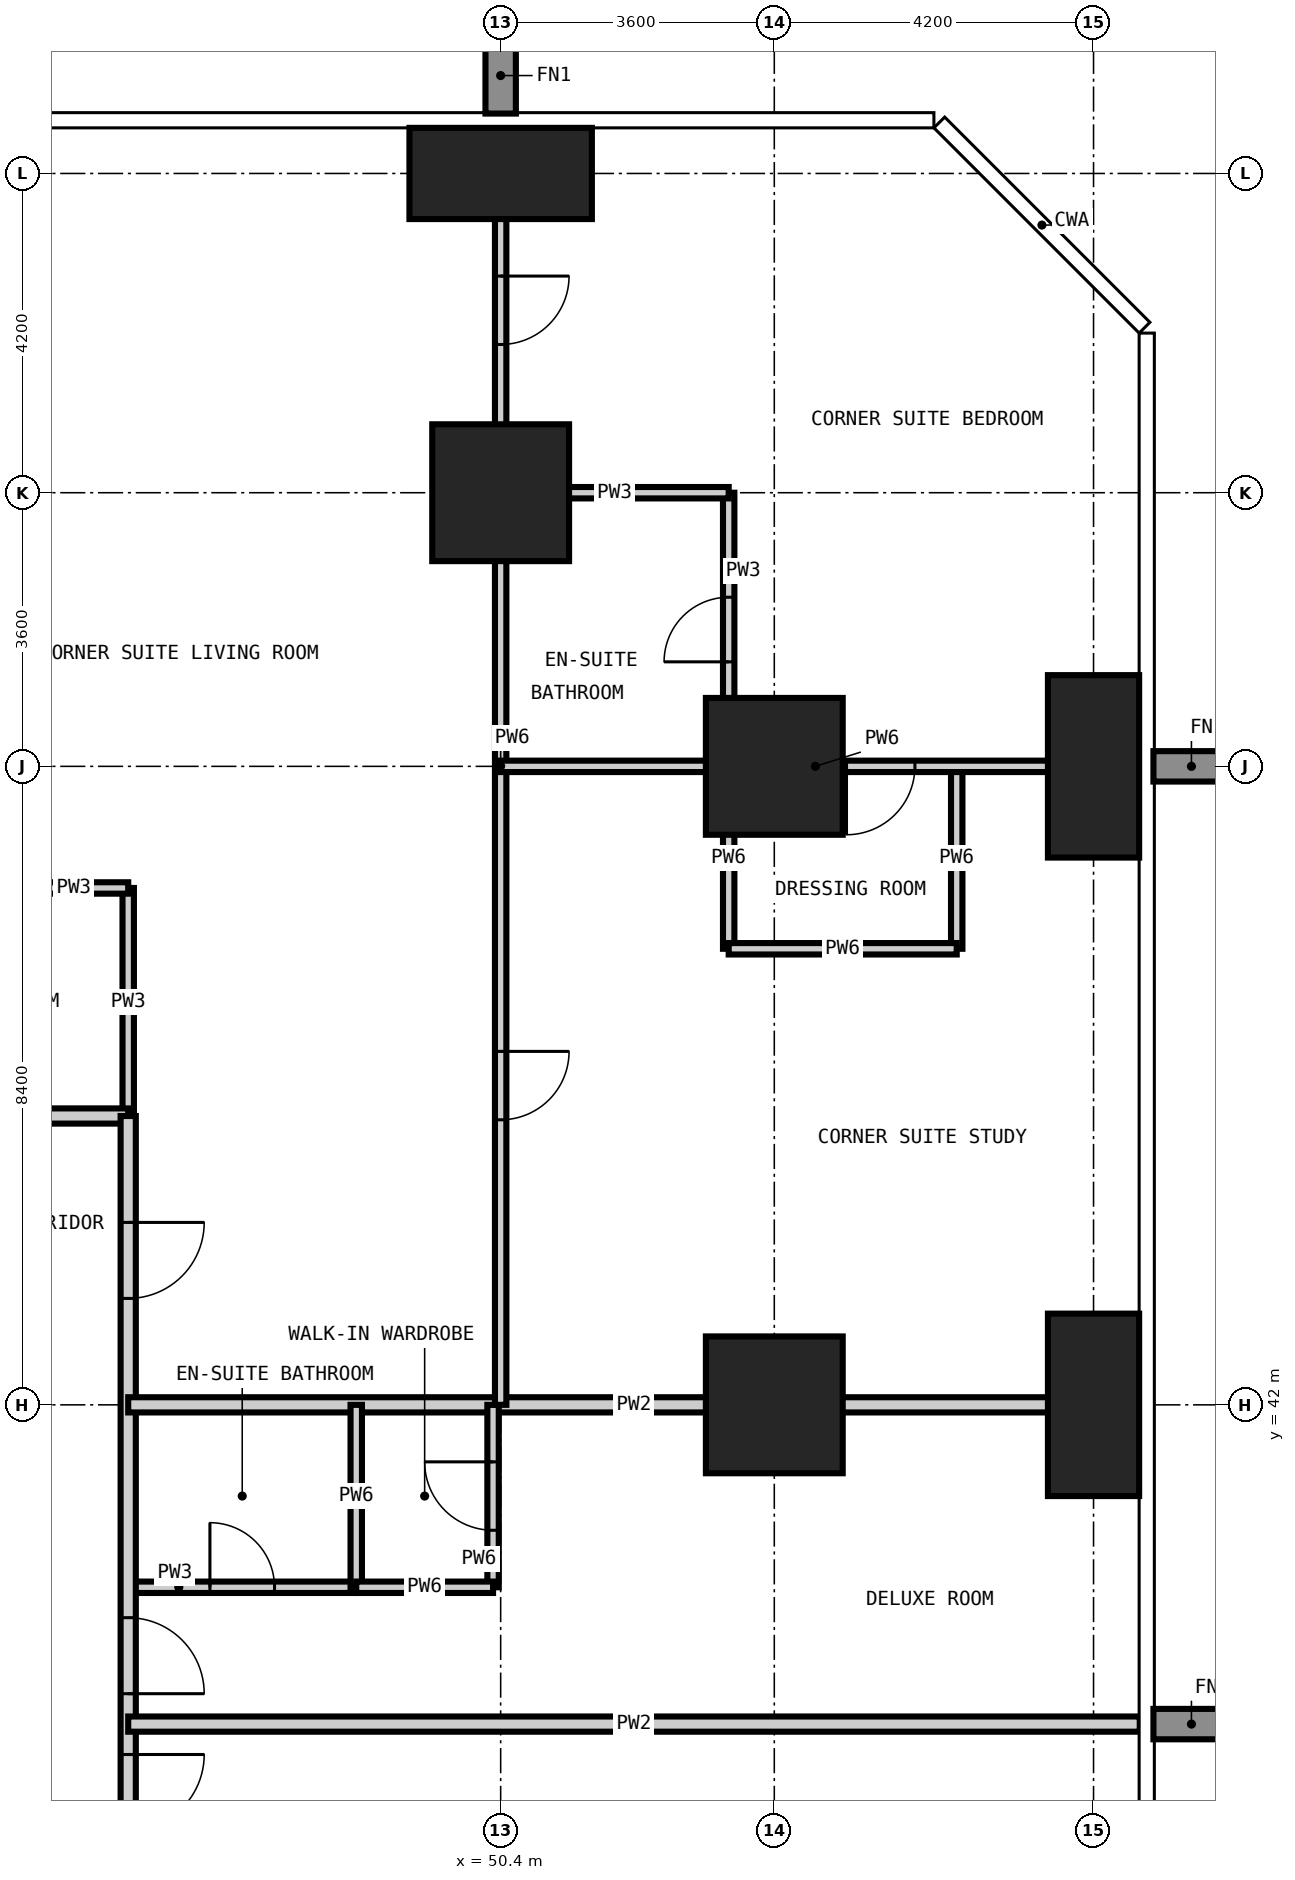
"""IFC4 building model, lengths in metres.
Left out: names, types, materials, properties, quantities, classifications, styles, units other than length and angle.
Written with IfcOpenShell. Run it as: python <this file> out.ifc"""

import sys

from ifc_helpers import new_model, si_unit, direction, frame, frame_2d, origin, origin_2d, place, context, subcontext, project, spatial, rectangle, extrude, element, fill, save


model = new_model("IFC4")
c1 = context("Model", 3, precision=1e-05, world=origin(), true_north=direction((0.0, 1.0)))
c2 = subcontext(c1, "Body", "Model", "MODEL_VIEW")
j1 = project(units=[si_unit("LENGTHUNIT", "METRE"), si_unit("PLANEANGLEUNIT", "RADIAN")], contexts=[c1])
p1 = place(None, origin())
s1 = spatial("IfcSite", under=j1, at=p1, CompositionType="ELEMENT")
p2 = place(p1, origin())
s2 = spatial("IfcBuilding", under=s1, at=p2, CompositionType="ELEMENT")
p3 = place(p2, frame((0.0, 0.0, 30.6)))
s3 = spatial("IfcBuildingStorey", under=s2, at=p3, CompositionType="ELEMENT", Elevation=30.6)
p4 = place(p3, frame((50.4, 54.0, -0.35), z_axis=(0.0, 0.0, 1.0), x_axis=(1.0, 0.0, 0.0)))
e1 = element("IfcColumn", 1, at=p4, inside=s3, PredefinedType="COLUMN", context=c2, shape_type="SweptSolid", body=[
    extrude(rectangle(XDim=1.8, YDim=1.8, at=origin_2d()), origin(), (0.0, 0.0, 1.0), 3.6),
])
p5 = place(p3, frame((50.4, 58.2, -0.35), z_axis=(0.0, 0.0, 1.0), x_axis=(1.0, 0.0, 0.0)))
e2 = element("IfcColumn", 2, at=p5, inside=s3, PredefinedType="COLUMN", context=c2, shape_type="SweptSolid", body=[
    extrude(rectangle(XDim=2.4, YDim=1.2, at=origin_2d()), origin(), (0.0, 0.0, 1.0), 3.6),
])
for number, where, z_axis, x_axis in (
    (3, (54.0, 42.0, -0.35), (0.0, 0.0, 1.0), (1.0, 0.0, 0.0)),
    (4, (54.0, 50.4, -0.35), (0.0, 0.0, 1.0), (1.0, 0.0, 0.0)),
):
    element("IfcColumn", number, at=place(p3, frame(where, z_axis=z_axis, x_axis=x_axis)), inside=s3, PredefinedType="COLUMN", context=c2, shape_type="SweptSolid", body=[
        extrude(rectangle(XDim=1.8, YDim=1.8, at=origin_2d()), origin(), (0.0, 0.0, 1.0), 3.6),
    ])
for number, where, z_axis, x_axis in (
    (5, (58.2, 42.0, -0.35), (0.0, 0.0, 1.0), (1.0, 0.0, 0.0)),
    (6, (58.2, 50.4, -0.35), (0.0, 0.0, 1.0), (1.0, 0.0, 0.0)),
):
    element("IfcColumn", number, at=place(p3, frame(where, z_axis=z_axis, x_axis=x_axis)), inside=s3, PredefinedType="COLUMN", context=c2, shape_type="SweptSolid", body=[
        extrude(rectangle(XDim=1.2, YDim=2.4, at=origin_2d()), origin(), (0.0, 0.0, 1.0), 3.6),
    ])
p6 = place(p3, frame((45.5, 45.8, 0.0), z_axis=(0.0, 0.0, 1.0), x_axis=(0.0, 1.0, 0.0)))
e7 = element("IfcWall", 7, at=p6, inside=s3, PredefinedType="PARTITIONING", context=c2, shape_type="SweptSolid", body=[
    extrude(rectangle(XDim=3.0, YDim=0.15, at=frame_2d((1.5, 0.0))), origin(), (0.0, 0.0, 1.0), 3.25),
])
p7 = place(p3, frame((53.4, 50.4, 0.0), z_axis=(0.0, 0.0, 1.0), x_axis=(0.0, 1.0, 0.0)))
e8 = element("IfcWall", 8, at=p7, inside=s3, PredefinedType="PARTITIONING", context=c2, shape_type="SweptSolid", body=[
    extrude(rectangle(XDim=3.6, YDim=0.15, at=frame_2d((1.8, 0.0))), origin(), (0.0, 0.0, 1.0), 3.25),
])
p8 = place(p7, frame((1.375, 0.0, 0.0)))
e9 = element("IfcOpeningElement", 9, at=p8, cuts=e8, PredefinedType="OPENING", context=c2, shape_type="SweptSolid", body=[
    extrude(rectangle(XDim=0.85, YDim=2.1, at=frame_2d((0.425, 1.05))), frame((0.0, 0.085, 0.0), z_axis=(0.0, -1.0, 0.0), x_axis=(1.0, 0.0, 0.0)), (0.0, 0.0, 1.0), 0.17),
])
p9 = place(p3, frame((45.5, 39.6, 0.0), z_axis=(0.0, 0.0, 1.0), x_axis=(1.0, 0.0, 0.0)))
e10 = element("IfcWall", 10, at=p9, inside=s3, PredefinedType="PARTITIONING", context=c2, shape_type="SweptSolid", body=[
    extrude(rectangle(XDim=3.0, YDim=0.15, at=frame_2d((1.5, 0.0))), origin(), (0.0, 0.0, 1.0), 3.25),
])
p10 = place(p9, frame((1.075, 0.0, 0.0)))
e11 = element("IfcOpeningElement", 11, at=p10, cuts=e10, PredefinedType="OPENING", context=c2, shape_type="SweptSolid", body=[
    extrude(rectangle(XDim=0.85, YDim=2.1, at=frame_2d((0.425, 1.05))), frame((0.0, 0.085, 0.0), z_axis=(0.0, -1.0, 0.0), x_axis=(1.0, 0.0, 0.0)), (0.0, 0.0, 1.0), 0.17),
])
p11 = place(p3, frame((42.0, 48.8, 0.0), z_axis=(0.0, 0.0, 1.0), x_axis=(1.0, 0.0, 0.0)))
e12 = element("IfcWall", 12, at=p11, inside=s3, PredefinedType="PARTITIONING", context=c2, shape_type="SweptSolid", body=[
    extrude(rectangle(XDim=3.5, YDim=0.15, at=frame_2d((1.75, 0.0))), origin(), (0.0, 0.0, 1.0), 3.25),
])
p12 = place(p11, frame((1.325, 0.0, 0.0)))
e13 = element("IfcOpeningElement", 13, at=p12, cuts=e12, PredefinedType="OPENING", context=c2, shape_type="SweptSolid", body=[
    extrude(rectangle(XDim=0.85, YDim=2.1, at=frame_2d((0.425, 1.05))), frame((0.0, 0.085, 0.0), z_axis=(0.0, -1.0, 0.0), x_axis=(1.0, 0.0, 0.0)), (0.0, 0.0, 1.0), 0.17),
])
p13 = place(p3, frame((50.4, 54.0, 0.0), z_axis=(0.0, 0.0, 1.0), x_axis=(1.0, 0.0, 0.0)))
e14 = element("IfcWall", 14, at=p13, inside=s3, PredefinedType="PARTITIONING", context=c2, shape_type="SweptSolid", body=[
    extrude(rectangle(XDim=3.0, YDim=0.15, at=frame_2d((1.5, 0.0))), origin(), (0.0, 0.0, 1.0), 3.25),
])
p14 = place(p3, frame((13.6, 45.8, 0.0), z_axis=(0.0, 0.0, 1.0), x_axis=(1.0, 0.0, 0.0)))
e15 = element("IfcWall", 15, at=p14, inside=s3, PredefinedType="PARTITIONING", context=c2, shape_type="SweptSolid", body=[
    extrude(rectangle(XDim=31.9, YDim=0.2, at=frame_2d((15.95, 0.0))), origin(), (0.0, 0.0, 1.0), 3.25),
])
p15 = place(p14, frame((6.0, 0.0, 0.0)))
e16 = element("IfcOpeningElement", 16, at=p15, cuts=e15, PredefinedType="OPENING", context=c2, shape_type="SweptSolid", body=[
    extrude(rectangle(XDim=1.0, YDim=2.2, at=frame_2d((0.5, 1.1))), frame((0.0, 0.11, 0.0), z_axis=(0.0, -1.0, 0.0), x_axis=(1.0, 0.0, 0.0)), (0.0, 0.0, 1.0), 0.22),
])
p16 = place(p14, frame((7.8, 0.0, 0.0)))
e17 = element("IfcOpeningElement", 17, at=p16, cuts=e15, PredefinedType="OPENING", context=c2, shape_type="SweptSolid", body=[
    extrude(rectangle(XDim=1.0, YDim=2.2, at=frame_2d((0.5, 1.1))), frame((0.0, 0.11, 0.0), z_axis=(0.0, -1.0, 0.0), x_axis=(1.0, 0.0, 0.0)), (0.0, 0.0, 1.0), 0.22),
])
p17 = place(p14, frame((14.4, 0.0, 0.0)))
e18 = element("IfcOpeningElement", 18, at=p17, cuts=e15, PredefinedType="OPENING", context=c2, shape_type="SweptSolid", body=[
    extrude(rectangle(XDim=1.0, YDim=2.2, at=frame_2d((0.5, 1.1))), frame((0.0, 0.11, 0.0), z_axis=(0.0, -1.0, 0.0), x_axis=(1.0, 0.0, 0.0)), (0.0, 0.0, 1.0), 0.22),
])
p18 = place(p14, frame((16.2, 0.0, 0.0)))
e19 = element("IfcOpeningElement", 19, at=p18, cuts=e15, PredefinedType="OPENING", context=c2, shape_type="SweptSolid", body=[
    extrude(rectangle(XDim=1.0, YDim=2.2, at=frame_2d((0.5, 1.1))), frame((0.0, 0.11, 0.0), z_axis=(0.0, -1.0, 0.0), x_axis=(1.0, 0.0, 0.0)), (0.0, 0.0, 1.0), 0.22),
])
p19 = place(p14, frame((22.8, 0.0, 0.0)))
e20 = element("IfcOpeningElement", 20, at=p19, cuts=e15, PredefinedType="OPENING", context=c2, shape_type="SweptSolid", body=[
    extrude(rectangle(XDim=1.0, YDim=2.2, at=frame_2d((0.5, 1.1))), frame((0.0, 0.11, 0.0), z_axis=(0.0, -1.0, 0.0), x_axis=(1.0, 0.0, 0.0)), (0.0, 0.0, 1.0), 0.22),
])
p20 = place(p14, frame((24.6, 0.0, 0.0)))
e21 = element("IfcOpeningElement", 21, at=p20, cuts=e15, PredefinedType="OPENING", context=c2, shape_type="SweptSolid", body=[
    extrude(rectangle(XDim=1.0, YDim=2.2, at=frame_2d((0.5, 1.1))), frame((0.0, 0.11, 0.0), z_axis=(0.0, -1.0, 0.0), x_axis=(1.0, 0.0, 0.0)), (0.0, 0.0, 1.0), 0.22),
])
p21 = place(p3, frame((45.5, 45.8, 0.0), z_axis=(0.0, 0.0, 1.0), x_axis=(0.0, -1.0, 0.0)))
e22 = element("IfcWall", 22, at=p21, inside=s3, PredefinedType="PARTITIONING", context=c2, shape_type="SweptSolid", body=[
    extrude(rectangle(XDim=32.2, YDim=0.2, at=frame_2d((16.1, 0.0))), origin(), (0.0, 0.0, 1.0), 3.25),
])
p22 = place(p21, frame((26.4, 0.0, 0.0)))
e23 = element("IfcOpeningElement", 23, at=p22, cuts=e22, PredefinedType="OPENING", context=c2, shape_type="SweptSolid", body=[
    extrude(rectangle(XDim=1.0, YDim=2.2, at=frame_2d((0.5, 1.1))), frame((0.0, 0.11, 0.0), z_axis=(0.0, -1.0, 0.0), x_axis=(1.0, 0.0, 0.0)), (0.0, 0.0, 1.0), 0.22),
])
p23 = place(p21, frame((22.2, 0.0, 0.0)))
e24 = element("IfcOpeningElement", 24, at=p23, cuts=e22, PredefinedType="OPENING", context=c2, shape_type="SweptSolid", body=[
    extrude(rectangle(XDim=1.0, YDim=2.2, at=frame_2d((0.5, 1.1))), frame((0.0, 0.11, 0.0), z_axis=(0.0, -1.0, 0.0), x_axis=(1.0, 0.0, 0.0)), (0.0, 0.0, 1.0), 0.22),
])
p24 = place(p21, frame((16.8, 0.0, 0.0)))
e25 = element("IfcOpeningElement", 25, at=p24, cuts=e22, PredefinedType="OPENING", context=c2, shape_type="SweptSolid", body=[
    extrude(rectangle(XDim=1.0, YDim=2.2, at=frame_2d((0.5, 1.1))), frame((0.0, 0.11, 0.0), z_axis=(0.0, -1.0, 0.0), x_axis=(1.0, 0.0, 0.0)), (0.0, 0.0, 1.0), 0.22),
])
p25 = place(p21, frame((15.0, 0.0, 0.0)))
e26 = element("IfcOpeningElement", 26, at=p25, cuts=e22, PredefinedType="OPENING", context=c2, shape_type="SweptSolid", body=[
    extrude(rectangle(XDim=1.0, YDim=2.2, at=frame_2d((0.5, 1.1))), frame((0.0, 0.11, 0.0), z_axis=(0.0, -1.0, 0.0), x_axis=(1.0, 0.0, 0.0)), (0.0, 0.0, 1.0), 0.22),
])
p26 = place(p21, frame((8.4, 0.0, 0.0)))
e27 = element("IfcOpeningElement", 27, at=p26, cuts=e22, PredefinedType="OPENING", context=c2, shape_type="SweptSolid", body=[
    extrude(rectangle(XDim=1.0, YDim=2.2, at=frame_2d((0.5, 1.1))), frame((0.0, 0.11, 0.0), z_axis=(0.0, -1.0, 0.0), x_axis=(1.0, 0.0, 0.0)), (0.0, 0.0, 1.0), 0.22),
])
p27 = place(p21, frame((6.6, 0.0, 0.0)))
e28 = element("IfcOpeningElement", 28, at=p27, cuts=e22, PredefinedType="OPENING", context=c2, shape_type="SweptSolid", body=[
    extrude(rectangle(XDim=1.0, YDim=2.2, at=frame_2d((0.5, 1.1))), frame((0.0, 0.11, 0.0), z_axis=(0.0, -1.0, 0.0), x_axis=(1.0, 0.0, 0.0)), (0.0, 0.0, 1.0), 0.22),
])
p28 = place(p21, frame((30.1, 0.0, 0.0)))
e29 = element("IfcOpeningElement", 29, at=p28, cuts=e22, PredefinedType="OPENING", context=c2, shape_type="SweptSolid", body=[
    extrude(rectangle(XDim=1.0, YDim=2.2, at=frame_2d((0.5, 1.1))), frame((0.0, 0.11, 0.0), z_axis=(0.0, -1.0, 0.0), x_axis=(1.0, 0.0, 0.0)), (0.0, 0.0, 1.0), 0.22),
])
p29 = place(p21, frame((1.4, 0.0, 0.0)))
e30 = element("IfcOpeningElement", 30, at=p29, cuts=e22, PredefinedType="OPENING", context=c2, shape_type="SweptSolid", body=[
    extrude(rectangle(XDim=1.0, YDim=2.2, at=frame_2d((0.5, 1.1))), frame((0.0, 0.11, 0.0), z_axis=(0.0, -1.0, 0.0), x_axis=(1.0, 0.0, 0.0)), (0.0, 0.0, 1.0), 0.22),
])
for number, where, z_axis, x_axis in (
    (31, (45.5, 37.8, 0.0), (0.0, 0.0, 1.0), (1.0, 0.0, 0.0)),
    (32, (45.5, 42.0, 0.0), (0.0, 0.0, 1.0), (1.0, 0.0, 0.0)),
):
    element("IfcWall", number, at=place(p3, frame(where, z_axis=z_axis, x_axis=x_axis)), inside=s3, PredefinedType="PARTITIONING", context=c2, shape_type="SweptSolid", body=[
        extrude(rectangle(XDim=13.308, YDim=0.2, at=frame_2d((6.654, 0.0))), origin(), (0.0, 0.0, 1.0), 3.25),
    ])
p30 = place(p3, frame((48.5, 39.6, 0.0), z_axis=(0.0, 0.0, 1.0), x_axis=(0.0, 1.0, 0.0)))
e33 = element("IfcWall", 33, at=p30, inside=s3, PredefinedType="PARTITIONING", context=c2, shape_type="SweptSolid", body=[
    extrude(rectangle(XDim=2.4, YDim=0.15, at=frame_2d((1.2, 0.0))), origin(), (0.0, 0.0, 1.0), 3.25),
])
p31 = place(p3, frame((50.3, 39.6, 0.0), z_axis=(0.0, 0.0, 1.0), x_axis=(0.0, 1.0, 0.0)))
e34 = element("IfcWall", 34, at=p31, inside=s3, PredefinedType="PARTITIONING", context=c2, shape_type="SweptSolid", body=[
    extrude(rectangle(XDim=2.4, YDim=0.15, at=frame_2d((1.2, 0.0))), origin(), (0.0, 0.0, 1.0), 3.25),
])
p32 = place(p31, frame((0.75, 0.0, 0.0)))
e35 = element("IfcOpeningElement", 35, at=p32, cuts=e34, PredefinedType="OPENING", context=c2, shape_type="SweptSolid", body=[
    extrude(rectangle(XDim=0.9, YDim=2.1, at=frame_2d((0.45, 1.05))), frame((0.0, 0.085, 0.0), z_axis=(0.0, -1.0, 0.0), x_axis=(1.0, 0.0, 0.0)), (0.0, 0.0, 1.0), 0.17),
])
p33 = place(p3, frame((50.4, 42.0, 0.0), z_axis=(0.0, 0.0, 1.0), x_axis=(0.0, 1.0, 0.0)))
e36 = element("IfcWall", 36, at=p33, inside=s3, PredefinedType="PARTITIONING", context=c2, shape_type="SweptSolid", body=[
    extrude(rectangle(XDim=16.808, YDim=0.15, at=frame_2d((8.404, 0.0))), origin(), (0.0, 0.0, 1.0), 3.25),
])
p34 = place(p33, frame((13.95, 0.0, 0.0)))
e37 = element("IfcOpeningElement", 37, at=p34, cuts=e36, PredefinedType="OPENING", context=c2, shape_type="SweptSolid", body=[
    extrude(rectangle(XDim=0.9, YDim=2.1, at=frame_2d((0.45, 1.05))), frame((0.0, 0.085, 0.0), z_axis=(0.0, -1.0, 0.0), x_axis=(1.0, 0.0, 0.0)), (0.0, 0.0, 1.0), 0.17),
])
p35 = place(p33, frame((3.75, 0.0, 0.0)))
e38 = element("IfcOpeningElement", 38, at=p35, cuts=e36, PredefinedType="OPENING", context=c2, shape_type="SweptSolid", body=[
    extrude(rectangle(XDim=0.9, YDim=2.1, at=frame_2d((0.45, 1.05))), frame((0.0, 0.085, 0.0), z_axis=(0.0, -1.0, 0.0), x_axis=(1.0, 0.0, 0.0)), (0.0, 0.0, 1.0), 0.17),
])
for number, where, z_axis, x_axis in (
    (39, (53.4, 48.0, 0.0), (0.0, 0.0, 1.0), (0.0, 1.0, 0.0)),
    (40, (56.4, 48.0, 0.0), (0.0, 0.0, 1.0), (0.0, 1.0, 0.0)),
):
    element("IfcWall", number, at=place(p3, frame(where, z_axis=z_axis, x_axis=x_axis)), inside=s3, PredefinedType="PARTITIONING", context=c2, shape_type="SweptSolid", body=[
        extrude(rectangle(XDim=2.4, YDim=0.15, at=frame_2d((1.2, 0.0))), origin(), (0.0, 0.0, 1.0), 3.25),
    ])
p36 = place(p3, frame((48.5, 39.6, 0.0), z_axis=(0.0, 0.0, 1.0), x_axis=(1.0, 0.0, 0.0)))
e41 = element("IfcWall", 41, at=p36, inside=s3, PredefinedType="PARTITIONING", context=c2, shape_type="SweptSolid", body=[
    extrude(rectangle(XDim=1.8, YDim=0.15, at=frame_2d((0.9, 0.0))), origin(), (0.0, 0.0, 1.0), 3.25),
])
p37 = place(p3, frame((53.4, 48.0, 0.0), z_axis=(0.0, 0.0, 1.0), x_axis=(1.0, 0.0, 0.0)))
e42 = element("IfcWall", 42, at=p37, inside=s3, PredefinedType="PARTITIONING", context=c2, shape_type="SweptSolid", body=[
    extrude(rectangle(XDim=3.0, YDim=0.15, at=frame_2d((1.5, 0.0))), origin(), (0.0, 0.0, 1.0), 3.25),
])
p38 = place(p3, frame((50.4, 50.4, 0.0), z_axis=(0.0, 0.0, 1.0), x_axis=(1.0, 0.0, 0.0)))
e43 = element("IfcWall", 43, at=p38, inside=s3, PredefinedType="PARTITIONING", context=c2, shape_type="SweptSolid", body=[
    extrude(rectangle(XDim=8.408, YDim=0.15, at=frame_2d((4.204, 0.0))), origin(), (0.0, 0.0, 1.0), 3.25),
])
p39 = place(p38, frame((4.55, 0.0, 0.0)))
e44 = element("IfcOpeningElement", 44, at=p39, cuts=e43, PredefinedType="OPENING", context=c2, shape_type="SweptSolid", body=[
    extrude(rectangle(XDim=0.9, YDim=2.1, at=frame_2d((0.45, 1.05))), frame((0.0, 0.085, 0.0), z_axis=(0.0, -1.0, 0.0), x_axis=(1.0, 0.0, 0.0)), (0.0, 0.0, 1.0), 0.17),
])
p40 = place(p26, origin())
e45 = element("IfcDoor", 45, at=p40, inside=s3, OperationType="SINGLE_SWING_LEFT", PredefinedType="DOOR", context=c2, shape_type="SweptSolid", body=[
    extrude(rectangle(XDim=1.0, YDim=2.2, at=frame_2d((0.5, 1.1))), frame((0.0, 0.025, 0.0), z_axis=(0.0, -1.0, 0.0), x_axis=(1.0, 0.0, 0.0)), (0.0, 0.0, 1.0), 0.05),
])
fill(e27, e45)
p41 = place(p27, origin())
e46 = element("IfcDoor", 46, at=p41, inside=s3, OperationType="SINGLE_SWING_RIGHT", PredefinedType="DOOR", context=c2, shape_type="SweptSolid", body=[
    extrude(rectangle(XDim=1.0, YDim=2.2, at=frame_2d((0.5, 1.1))), frame((0.0, 0.025, 0.0), z_axis=(0.0, -1.0, 0.0), x_axis=(1.0, 0.0, 0.0)), (0.0, 0.0, 1.0), 0.05),
])
fill(e28, e46)
p42 = place(p10, origin())
e47 = element("IfcDoor", 47, at=p42, inside=s3, OperationType="SINGLE_SWING_LEFT", PredefinedType="DOOR", context=c2, shape_type="SweptSolid", body=[
    extrude(rectangle(XDim=0.85, YDim=2.1, at=frame_2d((0.425, 1.05))), frame((0.0, 0.025, 0.0), z_axis=(0.0, -1.0, 0.0), x_axis=(1.0, 0.0, 0.0)), (0.0, 0.0, 1.0), 0.05),
])
fill(e11, e47)
p43 = place(p32, origin())
e48 = element("IfcDoor", 48, at=p43, inside=s3, OperationType="SINGLE_SWING_RIGHT", PredefinedType="DOOR", context=c2, shape_type="SweptSolid", body=[
    extrude(rectangle(XDim=0.9, YDim=2.1, at=frame_2d((0.45, 1.05))), frame((0.0, 0.025, 0.0), z_axis=(0.0, -1.0, 0.0), x_axis=(1.0, 0.0, 0.0)), (0.0, 0.0, 1.0), 0.05),
])
fill(e35, e48)
p44 = place(p29, origin())
e49 = element("IfcDoor", 49, at=p44, inside=s3, OperationType="SINGLE_SWING_LEFT", PredefinedType="DOOR", context=c2, shape_type="SweptSolid", body=[
    extrude(rectangle(XDim=1.0, YDim=2.2, at=frame_2d((0.5, 1.1))), frame((0.0, 0.025, 0.0), z_axis=(0.0, -1.0, 0.0), x_axis=(1.0, 0.0, 0.0)), (0.0, 0.0, 1.0), 0.05),
])
fill(e30, e49)
p45 = place(p34, frame((0.9, 0.0, 0.0), z_axis=(0.0, 0.0, 1.0), x_axis=(-1.0, 0.0, 0.0)))
e50 = element("IfcDoor", 50, at=p45, inside=s3, OperationType="SINGLE_SWING_LEFT", PredefinedType="DOOR", context=c2, shape_type="SweptSolid", body=[
    extrude(rectangle(XDim=0.9, YDim=2.1, at=frame_2d((0.45, 1.05))), frame((0.0, 0.025, 0.0), z_axis=(0.0, -1.0, 0.0), x_axis=(1.0, 0.0, 0.0)), (0.0, 0.0, 1.0), 0.05),
])
fill(e37, e50)
p46 = place(p8, origin())
e51 = element("IfcDoor", 51, at=p46, inside=s3, OperationType="SINGLE_SWING_LEFT", PredefinedType="DOOR", context=c2, shape_type="SweptSolid", body=[
    extrude(rectangle(XDim=0.85, YDim=2.1, at=frame_2d((0.425, 1.05))), frame((0.0, 0.025, 0.0), z_axis=(0.0, -1.0, 0.0), x_axis=(1.0, 0.0, 0.0)), (0.0, 0.0, 1.0), 0.05),
])
fill(e9, e51)
p47 = place(p39, frame((0.9, 0.0, 0.0), z_axis=(0.0, 0.0, 1.0), x_axis=(-1.0, 0.0, 0.0)))
e52 = element("IfcDoor", 52, at=p47, inside=s3, OperationType="SINGLE_SWING_RIGHT", PredefinedType="DOOR", context=c2, shape_type="SweptSolid", body=[
    extrude(rectangle(XDim=0.9, YDim=2.1, at=frame_2d((0.45, 1.05))), frame((0.0, 0.025, 0.0), z_axis=(0.0, -1.0, 0.0), x_axis=(1.0, 0.0, 0.0)), (0.0, 0.0, 1.0), 0.05),
])
fill(e44, e52)
p48 = place(p35, frame((0.9, 0.0, 0.0), z_axis=(0.0, 0.0, 1.0), x_axis=(-1.0, 0.0, 0.0)))
e53 = element("IfcDoor", 53, at=p48, inside=s3, OperationType="SINGLE_SWING_LEFT", PredefinedType="DOOR", context=c2, shape_type="SweptSolid", body=[
    extrude(rectangle(XDim=0.9, YDim=2.1, at=frame_2d((0.45, 1.05))), frame((0.0, 0.025, 0.0), z_axis=(0.0, -1.0, 0.0), x_axis=(1.0, 0.0, 0.0)), (0.0, 0.0, 1.0), 0.05),
])
fill(e38, e53)
save(model, sys.argv[1])
